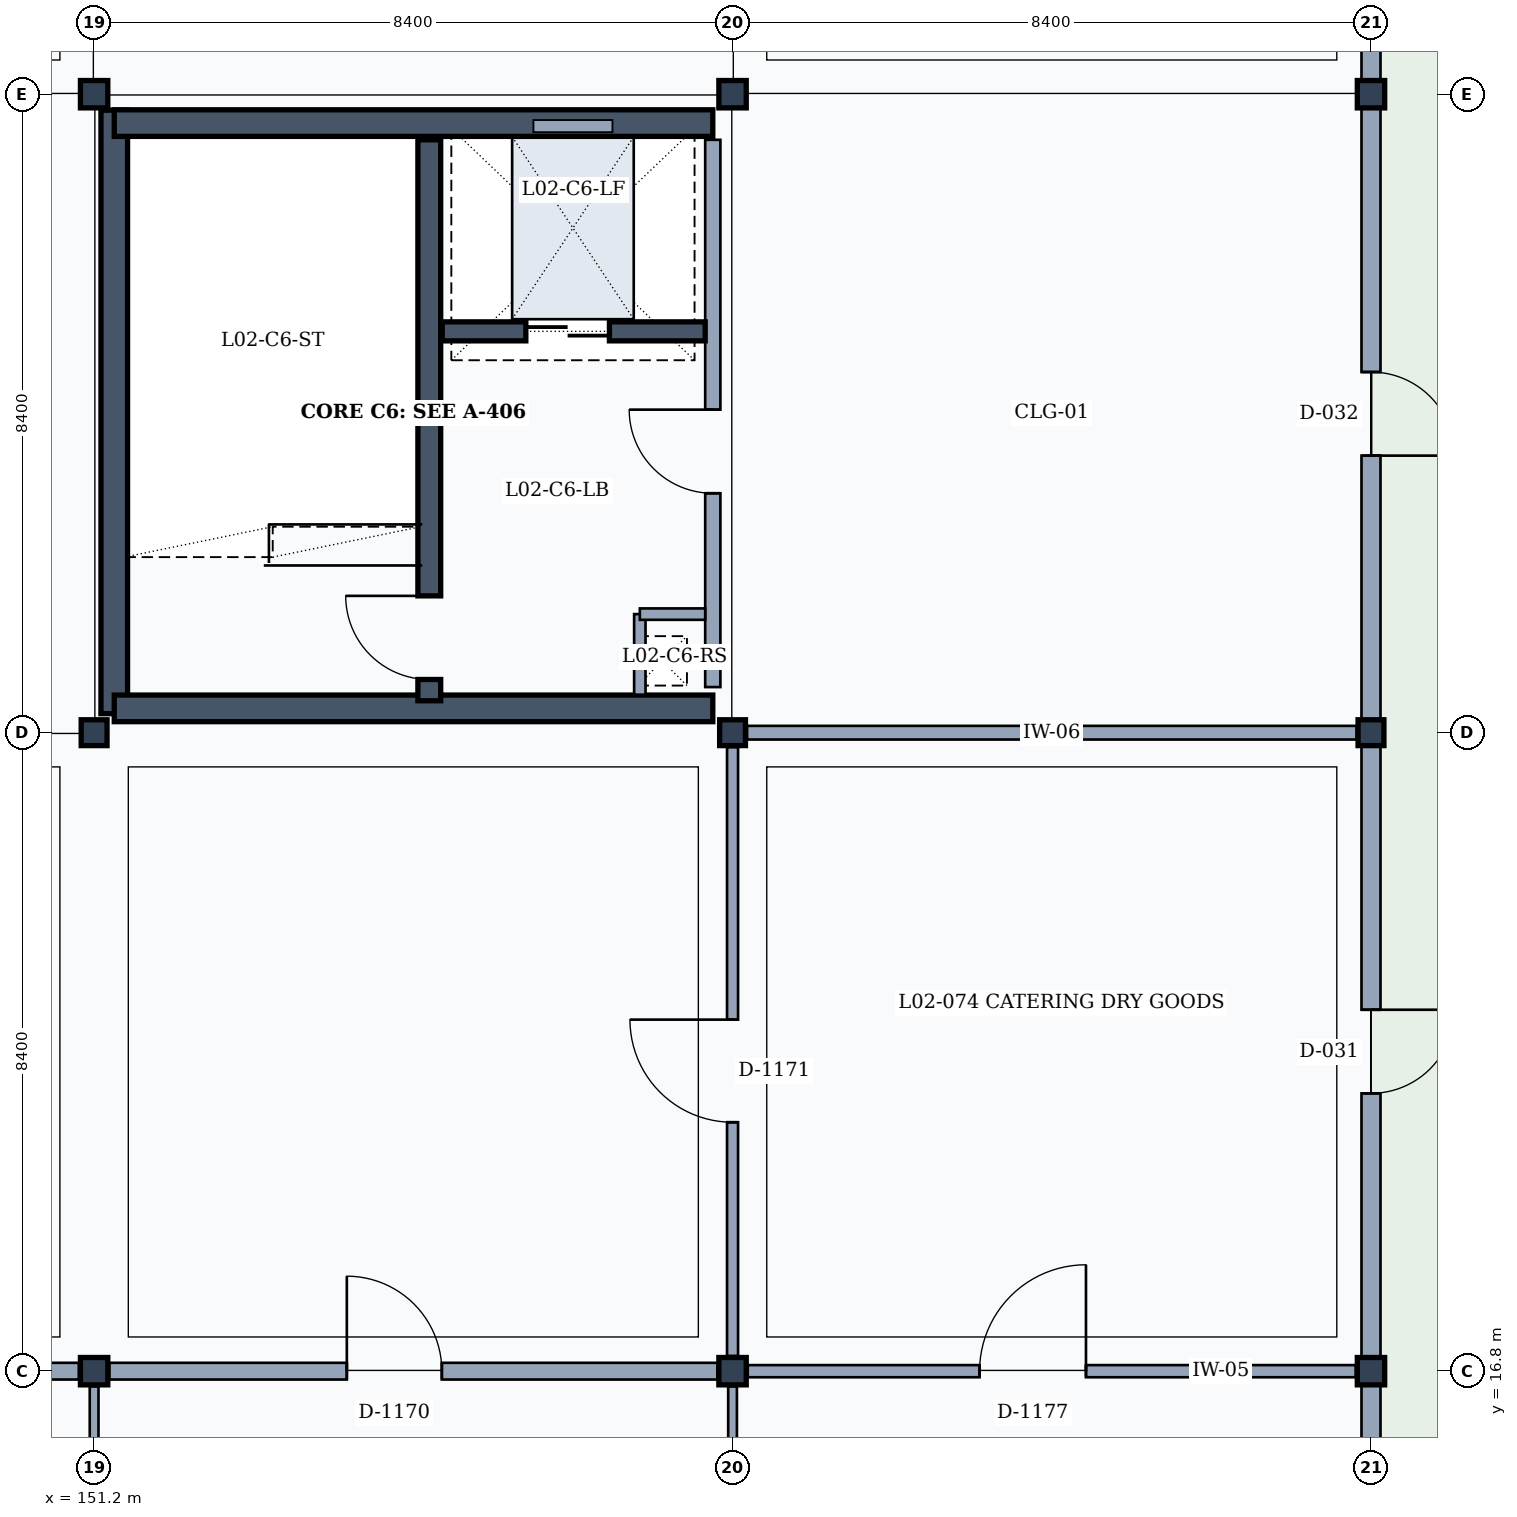
"""IFC4 building model, lengths in metres.
Left out: names, types, materials, properties, quantities, classifications, styles, units other than length and angle.
Written with IfcOpenShell. Run it as: python <this file> out.ifc"""

import sys

from ifc_helpers import new_model, si_unit, direction, frame, frame_2d, origin, origin_2d, place, context, subcontext, project, spatial, rectangle, extrude, element, fill, save


model = new_model("IFC4")
c1 = context("Model", 3, precision=1e-05, world=origin(), true_north=direction((0.0, 1.0)))
c2 = subcontext(c1, "Body", "Model", "MODEL_VIEW")
j1 = project(units=[si_unit("LENGTHUNIT", "METRE"), si_unit("PLANEANGLEUNIT", "RADIAN")], contexts=[c1])
p1 = place(None, origin())
s1 = spatial("IfcSite", under=j1, at=p1, CompositionType="ELEMENT")
p2 = place(p1, origin())
s2 = spatial("IfcBuilding", under=s1, at=p2, CompositionType="ELEMENT")
p3 = place(p2, frame((0.0, 0.0, 9.6)))
s3 = spatial("IfcBuildingStorey", under=s2, at=p3, CompositionType="ELEMENT", Elevation=9.6)
p4 = place(p3, frame((151.2, 16.8, 0.0), z_axis=(0.0, 0.0, 1.0), x_axis=(1.0, 0.0, 0.0)))
e1 = element("IfcColumn", 1, at=p4, inside=s3, PredefinedType="COLUMN", context=c2, shape_type="SweptSolid", body=[
    extrude(rectangle(XDim=0.36, YDim=0.36, at=origin_2d()), origin(), (0.0, 0.0, 1.0), 4.2),
])
p5 = place(p3, frame((151.2, 25.2, 0.0), z_axis=(0.0, 0.0, 1.0), x_axis=(1.0, 0.0, 0.0)))
e2 = element("IfcColumn", 2, at=p5, inside=s3, PredefinedType="COLUMN", context=c2, shape_type="SweptSolid", body=[
    extrude(rectangle(XDim=0.34, YDim=0.34, at=origin_2d()), origin(), (0.0, 0.0, 1.0), 4.2),
])
for number, where, z_axis, x_axis in (
    (3, (151.2, 33.6, 0.0), (0.0, 0.0, 1.0), (1.0, 0.0, 0.0)),
    (4, (159.6, 16.8, 0.0), (0.0, 0.0, 1.0), (1.0, 0.0, 0.0)),
):
    element("IfcColumn", number, at=place(p3, frame(where, z_axis=z_axis, x_axis=x_axis)), inside=s3, PredefinedType="COLUMN", context=c2, shape_type="SweptSolid", body=[
        extrude(rectangle(XDim=0.36, YDim=0.36, at=origin_2d()), origin(), (0.0, 0.0, 1.0), 4.2),
    ])
p6 = place(p3, frame((159.6, 25.2, 0.0), z_axis=(0.0, 0.0, 1.0), x_axis=(1.0, 0.0, 0.0)))
e5 = element("IfcColumn", 5, at=p6, inside=s3, PredefinedType="COLUMN", context=c2, shape_type="SweptSolid", body=[
    extrude(rectangle(XDim=0.34, YDim=0.34, at=origin_2d()), origin(), (0.0, 0.0, 1.0), 4.2),
])
for number, where, z_axis, x_axis in (
    (6, (159.6, 33.6, 0.0), (0.0, 0.0, 1.0), (1.0, 0.0, 0.0)),
    (7, (168.0, 16.8, 0.0), (0.0, 0.0, 1.0), (1.0, 0.0, 0.0)),
):
    element("IfcColumn", number, at=place(p3, frame(where, z_axis=z_axis, x_axis=x_axis)), inside=s3, PredefinedType="COLUMN", context=c2, shape_type="SweptSolid", body=[
        extrude(rectangle(XDim=0.36, YDim=0.36, at=origin_2d()), origin(), (0.0, 0.0, 1.0), 4.2),
    ])
p7 = place(p3, frame((168.0, 25.2, 0.0), z_axis=(0.0, 0.0, 1.0), x_axis=(1.0, 0.0, 0.0)))
e8 = element("IfcColumn", 8, at=p7, inside=s3, PredefinedType="COLUMN", context=c2, shape_type="SweptSolid", body=[
    extrude(rectangle(XDim=0.34, YDim=0.34, at=origin_2d()), origin(), (0.0, 0.0, 1.0), 4.2),
])
p8 = place(p3, frame((168.0, 33.6, 0.0), z_axis=(0.0, 0.0, 1.0), x_axis=(1.0, 0.0, 0.0)))
e9 = element("IfcColumn", 9, at=p8, inside=s3, PredefinedType="COLUMN", context=c2, shape_type="SweptSolid", body=[
    extrude(rectangle(XDim=0.36, YDim=0.36, at=origin_2d()), origin(), (0.0, 0.0, 1.0), 4.2),
])
p9 = place(p3, frame((168.0, 16.62, 0.0), z_axis=(0.0, 0.0, 1.0), x_axis=(0.0, -1.0, 0.0)))
e10 = element("IfcWall", 10, at=p9, inside=s3, PredefinedType="SOLIDWALL", context=c2, shape_type="SweptSolid", body=[
    extrude(rectangle(XDim=8.05, YDim=0.25, at=frame_2d((4.025, 0.0))), origin(), (0.0, 0.0, 1.0), 3.36),
])
p10 = place(p9, frame((3.475, 0.0, 0.0)))
e11 = element("IfcOpeningElement", 11, at=p10, cuts=e10, PredefinedType="OPENING", context=c2, shape_type="SweptSolid", body=[
    extrude(rectangle(XDim=1.1, YDim=2.2, at=frame_2d((0.55, 1.1))), frame((0.0, 0.135, 0.0), z_axis=(0.0, -1.0, 0.0), x_axis=(1.0, 0.0, 0.0)), (0.0, 0.0, 1.0), 0.27),
])
p11 = place(p3, frame((168.0, 25.03, 0.0), z_axis=(0.0, 0.0, 1.0), x_axis=(0.0, -1.0, 0.0)))
e12 = element("IfcWall", 12, at=p11, inside=s3, PredefinedType="SOLIDWALL", context=c2, shape_type="SweptSolid", body=[
    extrude(rectangle(XDim=8.05, YDim=0.25, at=frame_2d((4.025, 0.0))), origin(), (0.0, 0.0, 1.0), 3.36),
])
p12 = place(p11, frame((3.475, 0.0, 0.0)))
e13 = element("IfcOpeningElement", 13, at=p12, cuts=e12, PredefinedType="OPENING", context=c2, shape_type="SweptSolid", body=[
    extrude(rectangle(XDim=1.1, YDim=2.2, at=frame_2d((0.55, 1.1))), frame((0.0, 0.135, 0.0), z_axis=(0.0, -1.0, 0.0), x_axis=(1.0, 0.0, 0.0)), (0.0, 0.0, 1.0), 0.27),
])
p13 = place(p3, frame((168.0, 33.42, 0.0), z_axis=(0.0, 0.0, 1.0), x_axis=(0.0, -1.0, 0.0)))
e14 = element("IfcWall", 14, at=p13, inside=s3, PredefinedType="SOLIDWALL", context=c2, shape_type="SweptSolid", body=[
    extrude(rectangle(XDim=8.05, YDim=0.25, at=frame_2d((4.025, 0.0))), origin(), (0.0, 0.0, 1.0), 3.36),
])
p14 = place(p13, frame((3.475, 0.0, 0.0)))
e15 = element("IfcOpeningElement", 15, at=p14, cuts=e14, PredefinedType="OPENING", context=c2, shape_type="SweptSolid", body=[
    extrude(rectangle(XDim=1.1, YDim=2.2, at=frame_2d((0.55, 1.1))), frame((0.0, 0.135, 0.0), z_axis=(0.0, -1.0, 0.0), x_axis=(1.0, 0.0, 0.0)), (0.0, 0.0, 1.0), 0.27),
])
p15 = place(p3, frame((168.0, 41.83, 0.0), z_axis=(0.0, 0.0, 1.0), x_axis=(0.0, -1.0, 0.0)))
e16 = element("IfcWall", 16, at=p15, inside=s3, PredefinedType="SOLIDWALL", context=c2, shape_type="SweptSolid", body=[
    extrude(rectangle(XDim=8.05, YDim=0.25, at=frame_2d((4.025, 0.0))), origin(), (0.0, 0.0, 1.0), 3.36),
])
p16 = place(p15, frame((3.475, 0.0, 0.0)))
e17 = element("IfcOpeningElement", 17, at=p16, cuts=e16, PredefinedType="OPENING", context=c2, shape_type="SweptSolid", body=[
    extrude(rectangle(XDim=1.1, YDim=2.2, at=frame_2d((0.55, 1.1))), frame((0.0, 0.135, 0.0), z_axis=(0.0, -1.0, 0.0), x_axis=(1.0, 0.0, 0.0)), (0.0, 0.0, 1.0), 0.27),
])
p17 = place(p3, frame((151.465, 25.45, 0.0), z_axis=(0.0, 0.0, 1.0), x_axis=(0.0, 1.0, 0.0)))
e18 = element("IfcWall", 18, at=p17, inside=s3, PredefinedType="SHEAR", context=c2, shape_type="SweptSolid", body=[
    extrude(rectangle(XDim=7.94, YDim=0.35, at=frame_2d((3.97, 0.0))), origin(), (0.0, 0.0, 1.0), 3.95),
])
p18 = place(p3, frame((151.465, 33.22, 0.0), z_axis=(0.0, 0.0, 1.0), x_axis=(1.0, 0.0, 0.0)))
e19 = element("IfcWall", 19, at=p18, inside=s3, PredefinedType="SHEAR", context=c2, shape_type="SweptSolid", body=[
    extrude(rectangle(XDim=7.875, YDim=0.35, at=frame_2d((3.938, 0.0))), origin(), (0.0, 0.0, 1.0), 3.95),
])
p19 = place(p3, frame((159.34, 33.0, 0.0), z_axis=(0.0, 0.0, 1.0), x_axis=(0.0, -1.0, 0.0)))
e20 = element("IfcWall", 20, at=p19, inside=s3, PredefinedType="PARTITIONING", context=c2, shape_type="SweptSolid", body=[
    extrude(rectangle(XDim=7.2, YDim=0.2, at=frame_2d((3.6, 0.0))), origin(), (0.0, 0.0, 1.0), 3.32),
])
p20 = place(p19, frame((3.55, 0.0, 0.0)))
e21 = element("IfcOpeningElement", 21, at=p20, cuts=e20, PredefinedType="OPENING", context=c2, shape_type="SweptSolid", body=[
    extrude(rectangle(XDim=1.1, YDim=2.15, at=frame_2d((0.55, 1.075))), frame((0.0, 0.11, 0.0), z_axis=(0.0, -1.0, 0.0), x_axis=(1.0, 0.0, 0.0)), (0.0, 0.0, 1.0), 0.22),
])
p21 = place(p3, frame((159.34, 25.52, 0.0), z_axis=(0.0, 0.0, 1.0), x_axis=(-1.0, 0.0, 0.0)))
e22 = element("IfcWall", 22, at=p21, inside=s3, PredefinedType="SHEAR", context=c2, shape_type="SweptSolid", body=[
    extrude(rectangle(XDim=7.875, YDim=0.35, at=frame_2d((3.938, 0.0))), origin(), (0.0, 0.0, 1.0), 3.95),
])
p22 = place(p3, frame((155.61, 25.62, 0.0), z_axis=(0.0, 0.0, 1.0), x_axis=(0.0, 1.0, 0.0)))
e23 = element("IfcWall", 23, at=p22, inside=s3, PredefinedType="SHEAR", context=c2, shape_type="SweptSolid", body=[
    extrude(rectangle(XDim=7.38, YDim=0.3, at=frame_2d((3.69, 0.0))), origin(), (0.0, 0.0, 1.0), 3.95),
])
p23 = place(p22, frame((0.28, 0.0, 0.0)))
e24 = element("IfcOpeningElement", 24, at=p23, cuts=e23, PredefinedType="OPENING", context=c2, shape_type="SweptSolid", body=[
    extrude(rectangle(XDim=1.1, YDim=2.15, at=frame_2d((0.55, 1.075))), frame((0.0, 0.16, 0.0), z_axis=(0.0, -1.0, 0.0), x_axis=(1.0, 0.0, 0.0)), (0.0, 0.0, 1.0), 0.32),
])
p24 = place(p3, frame((158.38, 26.76, 0.0), z_axis=(0.0, 0.0, 1.0), x_axis=(0.0, -1.0, 0.0)))
e25 = element("IfcWall", 25, at=p24, inside=s3, PredefinedType="PARTITIONING", context=c2, shape_type="SweptSolid", body=[
    extrude(rectangle(XDim=1.06, YDim=0.15, at=frame_2d((0.53, 0.0))), origin(), (0.0, 0.0, 1.0), 3.32),
])
p25 = place(p3, frame((158.38, 26.76, 0.0), z_axis=(0.0, 0.0, 1.0), x_axis=(1.0, 0.0, 0.0)))
e26 = element("IfcWall", 26, at=p25, inside=s3, PredefinedType="PARTITIONING", context=c2, shape_type="SweptSolid", body=[
    extrude(rectangle(XDim=0.86, YDim=0.15, at=frame_2d((0.43, 0.0))), origin(), (0.0, 0.0, 1.0), 3.32),
])
p26 = place(p3, frame((155.78, 30.48, 0.0), z_axis=(0.0, 0.0, 1.0), x_axis=(1.0, 0.0, 0.0)))
e27 = element("IfcWall", 27, at=p26, inside=s3, PredefinedType="SHEAR", context=c2, shape_type="SweptSolid", body=[
    extrude(rectangle(XDim=3.46, YDim=0.25, at=frame_2d((1.73, 0.0))), origin(), (0.0, 0.0, 1.0), 3.95),
])
p27 = place(p26, frame((1.1, 0.0, 0.0)))
e28 = element("IfcOpeningElement", 28, at=p27, cuts=e27, PredefinedType="OPENING", context=c2, shape_type="SweptSolid", body=[
    extrude(rectangle(XDim=1.1, YDim=2.15, at=frame_2d((0.55, 1.075))), frame((0.0, 0.135, 0.0), z_axis=(0.0, -1.0, 0.0), x_axis=(1.0, 0.0, 0.0)), (0.0, 0.0, 1.0), 0.27),
])
p28 = place(p3, frame((151.2, 8.59, 0.0), z_axis=(0.0, 0.0, 1.0), x_axis=(0.0, 1.0, 0.0)))
e29 = element("IfcWall", 29, at=p28, inside=s3, PredefinedType="PARTITIONING", context=c2, shape_type="SweptSolid", body=[
    extrude(rectangle(XDim=8.01, YDim=0.115, at=frame_2d((4.005, 0.0))), origin(), (0.0, 0.0, 1.0), 3.32),
])
p29 = place(p3, frame((143.0, 16.8, 0.0), z_axis=(0.0, 0.0, 1.0), x_axis=(1.0, 0.0, 0.0)))
e30 = element("IfcWall", 30, at=p29, inside=s3, PredefinedType="PARTITIONING", context=c2, shape_type="SweptSolid", body=[
    extrude(rectangle(XDim=8.0, YDim=0.22, at=frame_2d((4.0, 0.0))), origin(), (0.0, 0.0, 1.0), 3.32),
])
p30 = place(p29, frame((2.925, 0.0, 0.0)))
e31 = element("IfcOpeningElement", 31, at=p30, cuts=e30, PredefinedType="OPENING", context=c2, shape_type="SweptSolid", body=[
    extrude(rectangle(XDim=1.65, YDim=2.25, at=frame_2d((0.825, 1.125))), frame((0.0, 0.12, 0.0), z_axis=(0.0, -1.0, 0.0), x_axis=(1.0, 0.0, 0.0)), (0.0, 0.0, 1.0), 0.24),
])
p31 = place(p3, frame((159.6, 8.59, 0.0), z_axis=(0.0, 0.0, 1.0), x_axis=(0.0, 1.0, 0.0)))
e32 = element("IfcWall", 32, at=p31, inside=s3, PredefinedType="PARTITIONING", context=c2, shape_type="SweptSolid", body=[
    extrude(rectangle(XDim=8.01, YDim=0.115, at=frame_2d((4.005, 0.0))), origin(), (0.0, 0.0, 1.0), 3.32),
])
p32 = place(p3, frame((151.4, 16.8, 0.0), z_axis=(0.0, 0.0, 1.0), x_axis=(1.0, 0.0, 0.0)))
e33 = element("IfcWall", 33, at=p32, inside=s3, PredefinedType="PARTITIONING", context=c2, shape_type="SweptSolid", body=[
    extrude(rectangle(XDim=8.0, YDim=0.22, at=frame_2d((4.0, 0.0))), origin(), (0.0, 0.0, 1.0), 3.32),
])
p33 = place(p32, frame((3.125, 0.0, 0.0)))
e34 = element("IfcOpeningElement", 34, at=p33, cuts=e33, PredefinedType="OPENING", context=c2, shape_type="SweptSolid", body=[
    extrude(rectangle(XDim=1.25, YDim=2.3, at=frame_2d((0.625, 1.15))), frame((0.0, 0.12, 0.0), z_axis=(0.0, -1.0, 0.0), x_axis=(1.0, 0.0, 0.0)), (0.0, 0.0, 1.0), 0.24),
])
p34 = place(p3, frame((159.6, 17.0, 0.0), z_axis=(0.0, 0.0, 1.0), x_axis=(0.0, 1.0, 0.0)))
e35 = element("IfcWall", 35, at=p34, inside=s3, PredefinedType="PARTITIONING", context=c2, shape_type="SweptSolid", body=[
    extrude(rectangle(XDim=8.01, YDim=0.145, at=frame_2d((4.005, 0.0))), origin(), (0.0, 0.0, 1.0), 3.32),
])
p35 = place(p34, frame((3.075, 0.0, 0.0)))
e36 = element("IfcOpeningElement", 36, at=p35, cuts=e35, PredefinedType="OPENING", context=c2, shape_type="SweptSolid", body=[
    extrude(rectangle(XDim=1.35, YDim=2.25, at=frame_2d((0.675, 1.125))), frame((0.0, 0.083, 0.0), z_axis=(0.0, -1.0, 0.0), x_axis=(1.0, 0.0, 0.0)), (0.0, 0.0, 1.0), 0.165),
])
p36 = place(p3, frame((159.8, 16.8, 0.0), z_axis=(0.0, 0.0, 1.0), x_axis=(1.0, 0.0, 0.0)))
e37 = element("IfcWall", 37, at=p36, inside=s3, PredefinedType="PARTITIONING", context=c2, shape_type="SweptSolid", body=[
    extrude(rectangle(XDim=8.0, YDim=0.16, at=frame_2d((4.0, 0.0))), origin(), (0.0, 0.0, 1.0), 3.32),
])
p37 = place(p36, frame((3.05, 0.0, 0.0)))
e38 = element("IfcOpeningElement", 38, at=p37, cuts=e37, PredefinedType="OPENING", context=c2, shape_type="SweptSolid", body=[
    extrude(rectangle(XDim=1.4, YDim=2.25, at=frame_2d((0.7, 1.125))), frame((0.0, 0.09, 0.0), z_axis=(0.0, -1.0, 0.0), x_axis=(1.0, 0.0, 0.0)), (0.0, 0.0, 1.0), 0.18),
])
p38 = place(p3, frame((159.79, 25.2, 0.0), z_axis=(0.0, 0.0, 1.0), x_axis=(1.0, 0.0, 0.0)))
e39 = element("IfcWall", 39, at=p38, inside=s3, PredefinedType="PARTITIONING", context=c2, shape_type="SweptSolid", body=[
    extrude(rectangle(XDim=8.02, YDim=0.18, at=frame_2d((4.01, 0.0))), origin(), (0.0, 0.0, 1.0), 3.32),
])
p39 = place(p12, origin())
e40 = element("IfcDoor", 40, at=p39, inside=s3, OperationType="SINGLE_SWING_LEFT", PredefinedType="DOOR", context=c2, shape_type="SweptSolid", body=[
    extrude(rectangle(XDim=1.1, YDim=2.2, at=frame_2d((0.55, 1.1))), frame((0.0, 0.025, 0.0), z_axis=(0.0, -1.0, 0.0), x_axis=(1.0, 0.0, 0.0)), (0.0, 0.0, 1.0), 0.05),
])
fill(e13, e40)
p40 = place(p14, origin())
e41 = element("IfcDoor", 41, at=p40, inside=s3, OperationType="SINGLE_SWING_RIGHT", PredefinedType="DOOR", context=c2, shape_type="SweptSolid", body=[
    extrude(rectangle(XDim=1.1, YDim=2.2, at=frame_2d((0.55, 1.1))), frame((0.0, 0.025, 0.0), z_axis=(0.0, -1.0, 0.0), x_axis=(1.0, 0.0, 0.0)), (0.0, 0.0, 1.0), 0.05),
])
fill(e15, e41)
p41 = place(p20, frame((1.1, 0.0, 0.0), z_axis=(0.0, 0.0, 1.0), x_axis=(-1.0, 0.0, 0.0)))
e42 = element("IfcDoor", 42, at=p41, inside=s3, OperationType="SINGLE_SWING_RIGHT", PredefinedType="DOOR", context=c2, shape_type="SweptSolid", body=[
    extrude(rectangle(XDim=1.1, YDim=2.15, at=frame_2d((0.55, 1.075))), frame((0.0, 0.025, 0.0), z_axis=(0.0, -1.0, 0.0), x_axis=(1.0, 0.0, 0.0)), (0.0, 0.0, 1.0), 0.05),
])
fill(e21, e42)
p42 = place(p23, origin())
e43 = element("IfcDoor", 43, at=p42, inside=s3, OperationType="SINGLE_SWING_RIGHT", PredefinedType="DOOR", context=c2, shape_type="SweptSolid", body=[
    extrude(rectangle(XDim=1.1, YDim=2.15, at=frame_2d((0.55, 1.075))), frame((0.0, 0.025, 0.0), z_axis=(0.0, -1.0, 0.0), x_axis=(1.0, 0.0, 0.0)), (0.0, 0.0, 1.0), 0.05),
])
fill(e24, e43)
p43 = place(p27, origin())
e44 = element("IfcDoor", 44, at=p43, inside=s3, OperationType="DOUBLE_DOOR_SLIDING", PredefinedType="DOOR", context=c2, shape_type="SweptSolid", body=[
    extrude(rectangle(XDim=1.1, YDim=2.15, at=frame_2d((0.55, 1.075))), frame((0.0, 0.025, 0.0), z_axis=(0.0, -1.0, 0.0), x_axis=(1.0, 0.0, 0.0)), (0.0, 0.0, 1.0), 0.05),
])
fill(e28, e44)
p44 = place(p33, origin())
e45 = element("IfcDoor", 45, at=p44, inside=s3, OperationType="SINGLE_SWING_LEFT", PredefinedType="DOOR", context=c2, shape_type="SweptSolid", body=[
    extrude(rectangle(XDim=1.25, YDim=2.3, at=frame_2d((0.625, 1.15))), frame((0.0, 0.025, 0.0), z_axis=(0.0, -1.0, 0.0), x_axis=(1.0, 0.0, 0.0)), (0.0, 0.0, 1.0), 0.05),
])
fill(e34, e45)
p45 = place(p35, origin())
e46 = element("IfcDoor", 46, at=p45, inside=s3, OperationType="SINGLE_SWING_RIGHT", PredefinedType="DOOR", context=c2, shape_type="SweptSolid", body=[
    extrude(rectangle(XDim=1.35, YDim=2.25, at=frame_2d((0.675, 1.125))), frame((0.0, 0.025, 0.0), z_axis=(0.0, -1.0, 0.0), x_axis=(1.0, 0.0, 0.0)), (0.0, 0.0, 1.0), 0.05),
])
fill(e36, e46)
p46 = place(p37, origin())
e47 = element("IfcDoor", 47, at=p46, inside=s3, OperationType="SINGLE_SWING_RIGHT", PredefinedType="DOOR", context=c2, shape_type="SweptSolid", body=[
    extrude(rectangle(XDim=1.4, YDim=2.25, at=frame_2d((0.7, 1.125))), frame((0.0, 0.025, 0.0), z_axis=(0.0, -1.0, 0.0), x_axis=(1.0, 0.0, 0.0)), (0.0, 0.0, 1.0), 0.05),
])
fill(e38, e47)
save(model, sys.argv[1])
